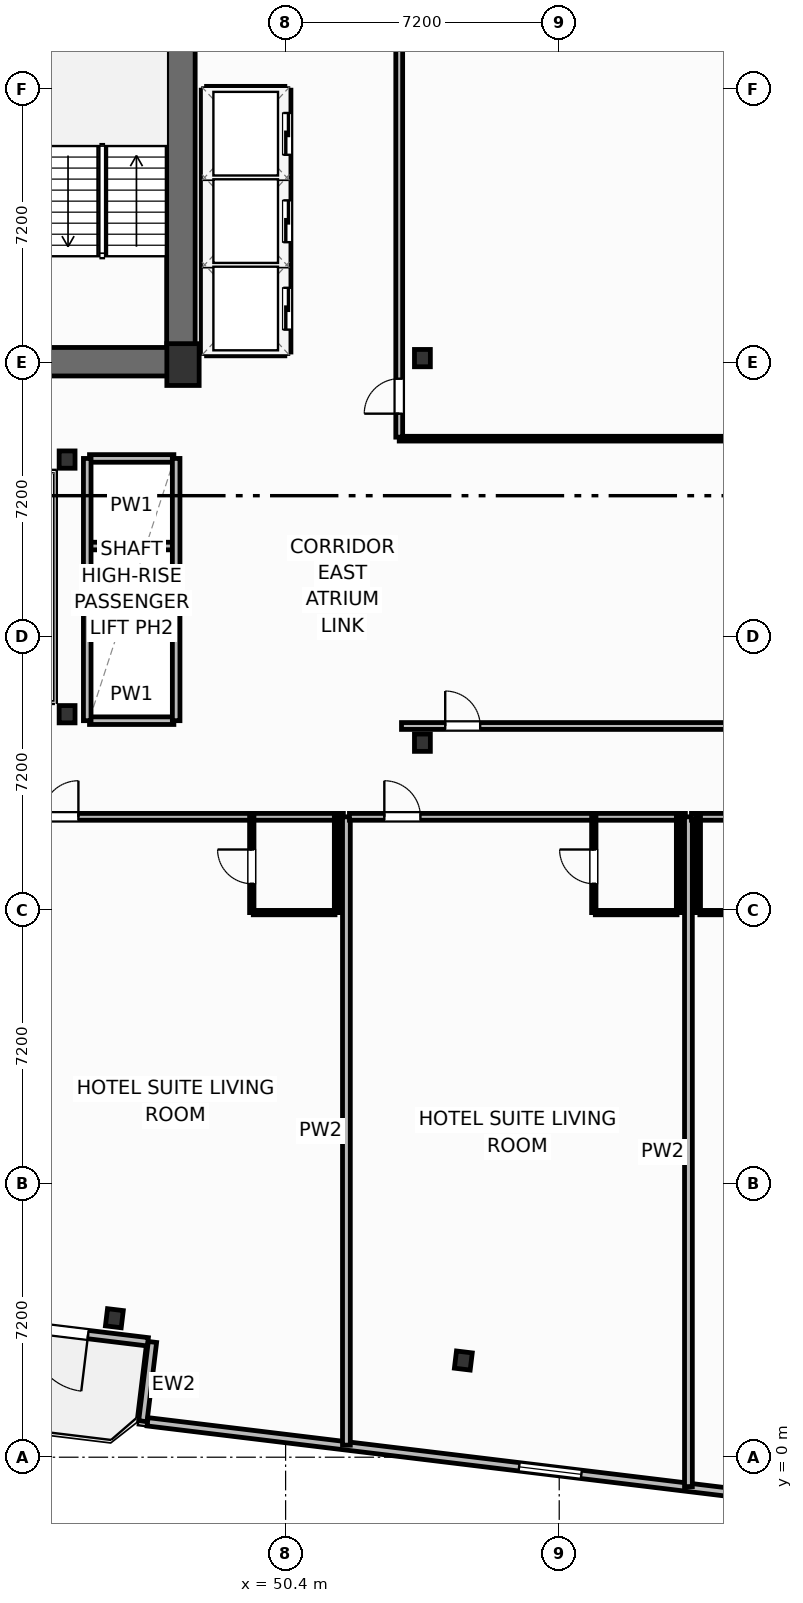
"""IFC4 building model, lengths in metres.
Left out: names, types, materials, properties, quantities, classifications, styles, units other than length and angle.
Written with IfcOpenShell. Run it as: python <this file> out.ifc"""

import sys

from ifc_helpers import new_model, si_unit, direction, frame, frame_2d, origin, origin_2d, place, context, subcontext, project, spatial, rectangle, i_section, extrude, element, fill, save


model = new_model("IFC4")
c1 = context("Model", 3, precision=1e-05, world=origin(), true_north=direction((0.0, 1.0)))
c2 = subcontext(c1, "Body", "Model", "MODEL_VIEW")
j1 = project(units=[si_unit("LENGTHUNIT", "METRE"), si_unit("PLANEANGLEUNIT", "RADIAN")], contexts=[c1])
p1 = place(None, origin())
s1 = spatial("IfcSite", under=j1, at=p1, CompositionType="ELEMENT")
p2 = place(p1, origin())
s2 = spatial("IfcBuilding", under=s1, at=p2, CompositionType="ELEMENT")
p3 = place(p2, frame((0.0, 0.0, 143.9)))
s3 = spatial("IfcBuildingStorey", under=s2, at=p3, CompositionType="ELEMENT", Elevation=143.9)
p4 = place(p3, frame((47.7, 28.75, 0.0), z_axis=(0.0, 0.0, 1.0), x_axis=(1.0, 0.0, 0.0)))
e1 = element("IfcColumn", 1, at=p4, inside=s3, PredefinedType="COLUMN", context=c2, shape_type="SweptSolid", body=[
    extrude(rectangle(XDim=0.85, YDim=1.1, at=origin_2d()), origin(), (0.0, 0.0, 1.0), 3.7),
])
for number, where, z_axis, x_axis in (
    (2, (44.65, 19.55, 0.0), (0.0, 0.0, 1.0), (1.0, 0.0, 0.0)),
    (3, (44.65, 26.25, 0.0), (0.0, 0.0, 1.0), (1.0, 0.0, 0.0)),
    (4, (54.0, 18.8, 0.0), (0.0, 0.0, 1.0), (1.0, 0.0, 0.0)),
    (5, (54.0, 28.92, 0.0), (0.0, 0.0, 1.0), (1.0, 0.0, 0.0)),
):
    element("IfcColumn", number, at=place(p3, frame(where, z_axis=z_axis, x_axis=x_axis)), inside=s3, PredefinedType="COLUMN", context=c2, shape_type="SweptSolid", body=[
        extrude(i_section(OverallWidth=0.418, OverallDepth=0.455, WebThickness=0.042, FlangeThickness=0.068, FilletRadius=0.025, at=origin_2d()), origin(), (0.0, 0.0, 1.0), 3.7),
    ])
p5 = place(p3, frame((47.645, 29.2, 0.0), z_axis=(0.0, 0.0, 1.0), x_axis=(0.0, 1.0, 0.0)))
e6 = element("IfcWall", 6, at=p5, inside=s3, PredefinedType="SHEAR", context=c2, shape_type="SweptSolid", body=[
    extrude(rectangle(XDim=9.22, YDim=0.75, at=frame_2d((4.61, 0.0))), origin(), (0.0, 0.0, 1.0), 3.45),
])
p6 = place(p3, frame((43.6, 28.825, 0.0), z_axis=(0.0, 0.0, 1.0), x_axis=(1.0, 0.0, 0.0)))
e7 = element("IfcWall", 7, at=p6, inside=s3, PredefinedType="SHEAR", context=c2, shape_type="SweptSolid", body=[
    extrude(rectangle(XDim=4.42, YDim=0.75, at=frame_2d((2.21, 0.0))), origin(), (0.0, 0.0, 1.0), 3.45),
])
for number, where, z_axis, x_axis in (
    (8, (45.894, 3.657, 0.0), (0.0, 0.0, 1.0), (0.993, -0.12, 0.0)),
    (9, (55.077, 2.544, 0.0), (0.0, 0.0, 1.0), (0.993, -0.12, 0.0)),
):
    element("IfcColumn", number, at=place(p3, frame(where, z_axis=z_axis, x_axis=x_axis)), inside=s3, PredefinedType="COLUMN", context=c2, shape_type="SweptSolid", body=[
        extrude(i_section(OverallWidth=0.418, OverallDepth=0.455, WebThickness=0.042, FlangeThickness=0.068, FilletRadius=0.025, at=origin_2d()), origin(), (0.0, 0.0, 1.0), 3.7),
    ])
p7 = place(p3, frame((46.776, 3.037, 0.0), z_axis=(0.0, 0.0, 1.0), x_axis=(-0.992735402148, 0.120318000826, 0.0)))
e10 = element("IfcWall", 10, at=p7, inside=s3, PredefinedType="SOLIDWALL", context=c2, shape_type="SweptSolid", body=[
    extrude(rectangle(XDim=6.0, YDim=0.22, at=frame_2d((3.0, 0.0))), origin(), (0.0, 0.0, 1.0), 2.73),
])
p8 = place(p7, frame((1.584, 0.0, 0.0)))
e11 = element("IfcOpeningElement", 11, at=p8, cuts=e10, PredefinedType="OPENING", context=c2, shape_type="SweptSolid", body=[
    extrude(rectangle(XDim=1.5, YDim=2.25, at=frame_2d((0.75, 1.125))), frame((0.0, 0.12, 0.0), z_axis=(0.0, -1.0, 0.0), x_axis=(1.0, 0.0, 0.0)), (0.0, 0.0, 1.0), 0.24),
])
p9 = place(p3, frame((46.896, 3.032, 0.0), z_axis=(0.0, 0.0, 1.0), x_axis=(-0.120327895535, -0.992734202874, 0.0)))
e12 = element("IfcWall", 12, at=p9, inside=s3, PredefinedType="SOLIDWALL", context=c2, shape_type="SweptSolid", body=[
    extrude(rectangle(XDim=2.1, YDim=0.22, at=frame_2d((1.05, 0.0))), origin(), (0.0, 0.0, 1.0), 2.73),
])
p10 = place(p3, frame((46.768, 0.932, 0.0), z_axis=(0.0, 0.0, 1.0), x_axis=(0.992733036814, -0.120337515419, 0.0)))
e13 = element("IfcWall", 13, at=p10, inside=s3, PredefinedType="SOLIDWALL", context=c2, shape_type="SweptSolid", body=[
    extrude(rectangle(XDim=21.347, YDim=0.22, at=frame_2d((10.673, 0.0))), origin(), (0.0, 0.0, 1.0), 2.73),
])
p11 = place(p10, frame((9.849, 0.0, 0.8)))
e14 = element("IfcOpeningElement", 14, at=p11, cuts=e13, PredefinedType="OPENING", context=c2, shape_type="SweptSolid", body=[
    extrude(rectangle(XDim=1.65, YDim=1.65, at=frame_2d((0.825, 0.825))), frame((0.0, 0.12, 0.0), z_axis=(0.0, -1.0, 0.0), x_axis=(1.0, 0.0, 0.0)), (0.0, 0.0, 1.0), 0.24),
])
p12 = place(p3, frame((43.08, 16.85, 0.0), z_axis=(0.0, 0.0, 1.0), x_axis=(1.0, 0.0, 0.0)))
e15 = element("IfcWall", 15, at=p12, inside=s3, PredefinedType="PARTITIONING", context=c2, shape_type="SweptSolid", body=[
    extrude(rectangle(XDim=8.84, YDim=0.18, at=frame_2d((4.42, 0.0))), origin(), (0.0, 0.0, 1.0), 3.45),
])
p13 = place(p12, frame((0.918, 0.0, 0.0)))
e16 = element("IfcOpeningElement", 16, at=p13, cuts=e15, PredefinedType="OPENING", context=c2, shape_type="SweptSolid", body=[
    extrude(rectangle(XDim=0.95, YDim=2.15, at=frame_2d((0.475, 1.075))), frame((0.0, 0.1, 0.0), z_axis=(0.0, -1.0, 0.0), x_axis=(1.0, 0.0, 0.0)), (0.0, 0.0, 1.0), 0.2),
])
p14 = place(p3, frame((49.55, 14.33, 0.0), z_axis=(0.0, 0.0, 1.0), x_axis=(1.0, 0.0, 0.0)))
e17 = element("IfcWall", 17, at=p14, inside=s3, PredefinedType="PARTITIONING", context=c2, shape_type="SweptSolid", body=[
    extrude(rectangle(XDim=2.15, YDim=0.115, at=frame_2d((1.075, 0.0))), origin(), (0.0, 0.0, 1.0), 3.45),
])
p15 = place(p3, frame((49.51, 14.33, 0.0), z_axis=(0.0, 0.0, 1.0), x_axis=(0.0, 1.0, 0.0)))
e18 = element("IfcWall", 18, at=p15, inside=s3, PredefinedType="PARTITIONING", context=c2, shape_type="SweptSolid", body=[
    extrude(rectangle(XDim=2.52, YDim=0.115, at=frame_2d((1.26, 0.0))), origin(), (0.0, 0.0, 1.0), 3.45),
])
p16 = place(p15, frame((0.76, 0.0, 0.0)))
e19 = element("IfcOpeningElement", 19, at=p16, cuts=e18, PredefinedType="OPENING", context=c2, shape_type="SweptSolid", body=[
    extrude(rectangle(XDim=0.9, YDim=2.05, at=frame_2d((0.45, 1.025))), frame((0.0, 0.067, 0.0), z_axis=(0.0, -1.0, 0.0), x_axis=(1.0, 0.0, 0.0)), (0.0, 0.0, 1.0), 0.135),
])
p17 = place(p3, frame((51.74, 14.33, 0.0), z_axis=(0.0, 0.0, 1.0), x_axis=(0.0, 1.0, 0.0)))
e20 = element("IfcWall", 20, at=p17, inside=s3, PredefinedType="PARTITIONING", context=c2, shape_type="SweptSolid", body=[
    extrude(rectangle(XDim=2.52, YDim=0.115, at=frame_2d((1.26, 0.0))), origin(), (0.0, 0.0, 1.0), 3.45),
])
p18 = place(p3, frame((52.0, 0.318, 0.0), z_axis=(0.0, 0.0, 1.0), x_axis=(0.0, 1.0, 0.0)))
e21 = element("IfcWall", 21, at=p18, inside=s3, PredefinedType="PARTITIONING", context=c2, shape_type="SweptSolid", body=[
    extrude(rectangle(XDim=16.532, YDim=0.205, at=frame_2d((8.266, 0.0))), origin(), (0.0, 0.0, 1.0), 3.45),
])
p19 = place(p3, frame((52.08, 16.85, 0.0), z_axis=(0.0, 0.0, 1.0), x_axis=(1.0, 0.0, 0.0)))
e22 = element("IfcWall", 22, at=p19, inside=s3, PredefinedType="PARTITIONING", context=c2, shape_type="SweptSolid", body=[
    extrude(rectangle(XDim=8.84, YDim=0.18, at=frame_2d((4.42, 0.0))), origin(), (0.0, 0.0, 1.0), 3.45),
])
p20 = place(p19, frame((0.918, 0.0, 0.0)))
e23 = element("IfcOpeningElement", 23, at=p20, cuts=e22, PredefinedType="OPENING", context=c2, shape_type="SweptSolid", body=[
    extrude(rectangle(XDim=0.95, YDim=2.15, at=frame_2d((0.475, 1.075))), frame((0.0, 0.1, 0.0), z_axis=(0.0, -1.0, 0.0), x_axis=(1.0, 0.0, 0.0)), (0.0, 0.0, 1.0), 0.2),
])
p21 = place(p3, frame((58.55, 14.33, 0.0), z_axis=(0.0, 0.0, 1.0), x_axis=(1.0, 0.0, 0.0)))
e24 = element("IfcWall", 24, at=p21, inside=s3, PredefinedType="PARTITIONING", context=c2, shape_type="SweptSolid", body=[
    extrude(rectangle(XDim=2.15, YDim=0.115, at=frame_2d((1.075, 0.0))), origin(), (0.0, 0.0, 1.0), 3.45),
])
p22 = place(p3, frame((58.51, 14.33, 0.0), z_axis=(0.0, 0.0, 1.0), x_axis=(0.0, 1.0, 0.0)))
e25 = element("IfcWall", 25, at=p22, inside=s3, PredefinedType="PARTITIONING", context=c2, shape_type="SweptSolid", body=[
    extrude(rectangle(XDim=2.52, YDim=0.115, at=frame_2d((1.26, 0.0))), origin(), (0.0, 0.0, 1.0), 3.45),
])
p23 = place(p22, frame((0.76, 0.0, 0.0)))
e26 = element("IfcOpeningElement", 26, at=p23, cuts=e25, PredefinedType="OPENING", context=c2, shape_type="SweptSolid", body=[
    extrude(rectangle(XDim=0.9, YDim=2.05, at=frame_2d((0.45, 1.025))), frame((0.0, 0.067, 0.0), z_axis=(0.0, -1.0, 0.0), x_axis=(1.0, 0.0, 0.0)), (0.0, 0.0, 1.0), 0.135),
])
p24 = place(p3, frame((60.74, 14.33, 0.0), z_axis=(0.0, 0.0, 1.0), x_axis=(0.0, 1.0, 0.0)))
e27 = element("IfcWall", 27, at=p24, inside=s3, PredefinedType="PARTITIONING", context=c2, shape_type="SweptSolid", body=[
    extrude(rectangle(XDim=2.52, YDim=0.115, at=frame_2d((1.26, 0.0))), origin(), (0.0, 0.0, 1.0), 3.45),
])
p25 = place(p3, frame((61.0, -0.773, 0.0), z_axis=(0.0, 0.0, 1.0), x_axis=(0.0, 1.0, 0.0)))
e28 = element("IfcWall", 28, at=p25, inside=s3, PredefinedType="PARTITIONING", context=c2, shape_type="SweptSolid", body=[
    extrude(rectangle(XDim=17.623, YDim=0.205, at=frame_2d((8.812, 0.0))), origin(), (0.0, 0.0, 1.0), 3.45),
])
p26 = place(p3, frame((61.08, 16.85, 0.0), z_axis=(0.0, 0.0, 1.0), x_axis=(1.0, 0.0, 0.0)))
e29 = element("IfcWall", 29, at=p26, inside=s3, PredefinedType="PARTITIONING", context=c2, shape_type="SweptSolid", body=[
    extrude(rectangle(XDim=14.387, YDim=0.18, at=frame_2d((7.193, 0.0))), origin(), (0.0, 0.0, 1.0), 3.45),
])
p27 = place(p26, frame((3.11, 0.0, 0.0)))
e30 = element("IfcOpeningElement", 30, at=p27, cuts=e29, PredefinedType="OPENING", context=c2, shape_type="SweptSolid", body=[
    extrude(rectangle(XDim=0.95, YDim=2.15, at=frame_2d((0.475, 1.075))), frame((0.0, 0.1, 0.0), z_axis=(0.0, -1.0, 0.0), x_axis=(1.0, 0.0, 0.0)), (0.0, 0.0, 1.0), 0.2),
])
p28 = place(p3, frame((61.3, 14.33, 0.0), z_axis=(0.0, 0.0, 1.0), x_axis=(1.0, 0.0, 0.0)))
e31 = element("IfcWall", 31, at=p28, inside=s3, PredefinedType="PARTITIONING", context=c2, shape_type="SweptSolid", body=[
    extrude(rectangle(XDim=1.807, YDim=0.115, at=frame_2d((0.904, 0.0))), origin(), (0.0, 0.0, 1.0), 3.45),
])
p29 = place(p3, frame((61.26, 14.33, 0.0), z_axis=(0.0, 0.0, 1.0), x_axis=(0.0, 1.0, 0.0)))
e32 = element("IfcWall", 32, at=p29, inside=s3, PredefinedType="PARTITIONING", context=c2, shape_type="SweptSolid", body=[
    extrude(rectangle(XDim=2.52, YDim=0.115, at=frame_2d((1.26, 0.0))), origin(), (0.0, 0.0, 1.0), 3.45),
])
p30 = place(p3, frame((53.45, 19.24, 0.0), z_axis=(0.0, 0.0, 1.0), x_axis=(1.0, 0.0, 0.0)))
e33 = element("IfcWall", 33, at=p30, inside=s3, PredefinedType="PARTITIONING", context=c2, shape_type="SweptSolid", body=[
    extrude(rectangle(XDim=22.307, YDim=0.18, at=frame_2d((11.153, 0.0))), origin(), (0.0, 0.0, 1.0), 2.662),
])
p31 = place(p30, frame((1.15, 0.0, 0.0)))
e34 = element("IfcOpeningElement", 34, at=p31, cuts=e33, PredefinedType="OPENING", context=c2, shape_type="SweptSolid", body=[
    extrude(rectangle(XDim=0.92, YDim=2.05, at=frame_2d((0.46, 1.025))), frame((0.0, 0.1, 0.0), z_axis=(0.0, -1.0, 0.0), x_axis=(1.0, 0.0, 0.0)), (0.0, 0.0, 1.0), 0.2),
])
p32 = place(p3, frame((53.39, 26.8, 0.0), z_axis=(0.0, 0.0, 1.0), x_axis=(1.0, 0.0, 0.0)))
e35 = element("IfcWall", 35, at=p32, inside=s3, PredefinedType="PARTITIONING", context=c2, shape_type="SweptSolid", body=[
    extrude(rectangle(XDim=23.283, YDim=0.125, at=frame_2d((11.642, 0.0))), origin(), (0.0, 0.0, 1.0), 3.45),
])
p33 = place(p3, frame((53.39, 26.84, 0.0), z_axis=(0.0, 0.0, 1.0), x_axis=(0.0, 1.0, 0.0)))
e36 = element("IfcWall", 36, at=p33, inside=s3, PredefinedType="PARTITIONING", context=c2, shape_type="SweptSolid", body=[
    extrude(rectangle(XDim=12.46, YDim=0.18, at=frame_2d((6.23, 0.0))), origin(), (0.0, 0.0, 1.0), 3.45),
])
p34 = place(p33, frame((0.618, 0.0, 0.0)))
e37 = element("IfcOpeningElement", 37, at=p34, cuts=e36, PredefinedType="OPENING", context=c2, shape_type="SweptSolid", body=[
    extrude(rectangle(XDim=0.92, YDim=2.05, at=frame_2d((0.46, 1.025))), frame((0.0, 0.1, 0.0), z_axis=(0.0, -1.0, 0.0), x_axis=(1.0, 0.0, 0.0)), (0.0, 0.0, 1.0), 0.2),
])
for number, where, z_axis, x_axis in (
    (38, (48.32, 31.375, 0.0), (0.0, 0.0, 1.0), (1.0, 0.0, 0.0)),
    (39, (48.32, 33.675, 0.0), (0.0, 0.0, 1.0), (1.0, 0.0, 0.0)),
):
    element("IfcWall", number, at=place(p3, frame(where, z_axis=z_axis, x_axis=x_axis)), inside=s3, PredefinedType="PARTITIONING", context=c2, shape_type="SweptSolid", body=[
        extrude(rectangle(XDim=2.06, YDim=0.2, at=frame_2d((1.03, 0.0))), origin(), (0.0, 0.0, 1.0), 3.45),
    ])
p35 = place(p3, frame((48.32, 29.08, 0.0), z_axis=(0.0, 0.0, 1.0), x_axis=(1.0, 0.0, 0.0)))
e40 = element("IfcWall", 40, at=p35, inside=s3, PredefinedType="PARTITIONING", context=c2, shape_type="SweptSolid", body=[
    extrude(rectangle(XDim=2.06, YDim=0.2, at=frame_2d((1.03, 0.0))), origin(), (0.0, 0.0, 1.0), 2.662),
])
p36 = place(p3, frame((48.32, 35.97, 0.0), z_axis=(0.0, 0.0, 1.0), x_axis=(1.0, 0.0, 0.0)))
e41 = element("IfcWall", 41, at=p36, inside=s3, PredefinedType="PARTITIONING", context=c2, shape_type="SweptSolid", body=[
    extrude(rectangle(XDim=2.06, YDim=0.2, at=frame_2d((1.03, 0.0))), origin(), (0.0, 0.0, 1.0), 3.45),
])
p37 = place(p3, frame((48.28, 29.08, 0.0), z_axis=(0.0, 0.0, 1.0), x_axis=(0.0, 1.0, 0.0)))
e42 = element("IfcWall", 42, at=p37, inside=s3, PredefinedType="PARTITIONING", context=c2, shape_type="SweptSolid", body=[
    extrude(rectangle(XDim=6.89, YDim=0.2, at=frame_2d((3.445, 0.0))), origin(), (0.0, 0.0, 1.0), 3.45),
])
p38 = place(p3, frame((50.44, 29.08, 0.0), z_axis=(0.0, 0.0, 1.0), x_axis=(0.0, 1.0, 0.0)))
e43 = element("IfcWall", 43, at=p38, inside=s3, PredefinedType="PARTITIONING", context=c2, shape_type="SweptSolid", body=[
    extrude(rectangle(XDim=6.89, YDim=0.2, at=frame_2d((3.445, 0.0))), origin(), (0.0, 0.0, 1.0), 3.45),
])
p39 = place(p38, frame((0.59, 0.0, 0.0)))
e44 = element("IfcOpeningElement", 44, at=p39, cuts=e43, PredefinedType="OPENING", context=c2, shape_type="SweptSolid", body=[
    extrude(rectangle(XDim=1.1, YDim=2.15, at=frame_2d((0.55, 1.075))), frame((0.0, 0.11, 0.0), z_axis=(0.0, -1.0, 0.0), x_axis=(1.0, 0.0, 0.0)), (0.0, 0.0, 1.0), 0.22),
])
p40 = place(p38, frame((2.89, 0.0, 0.0)))
e45 = element("IfcOpeningElement", 45, at=p40, cuts=e43, PredefinedType="OPENING", context=c2, shape_type="SweptSolid", body=[
    extrude(rectangle(XDim=1.1, YDim=2.15, at=frame_2d((0.55, 1.075))), frame((0.0, 0.11, 0.0), z_axis=(0.0, -1.0, 0.0), x_axis=(1.0, 0.0, 0.0)), (0.0, 0.0, 1.0), 0.22),
])
p41 = place(p38, frame((5.19, 0.0, 0.0)))
e46 = element("IfcOpeningElement", 46, at=p41, cuts=e43, PredefinedType="OPENING", context=c2, shape_type="SweptSolid", body=[
    extrude(rectangle(XDim=1.1, YDim=2.15, at=frame_2d((0.55, 1.075))), frame((0.0, 0.11, 0.0), z_axis=(0.0, -1.0, 0.0), x_axis=(1.0, 0.0, 0.0)), (0.0, 0.0, 1.0), 0.22),
])
for number, where, z_axis, x_axis in (
    (47, (45.24, 21.675, 0.0), (0.0, 0.0, 1.0), (1.0, 0.0, 0.0)),
    (48, (45.24, 23.975, 0.0), (0.0, 0.0, 1.0), (1.0, 0.0, 0.0)),
):
    element("IfcWall", number, at=place(p3, frame(where, z_axis=z_axis, x_axis=x_axis)), inside=s3, PredefinedType="PARTITIONING", context=c2, shape_type="SweptSolid", body=[
        extrude(rectangle(XDim=2.22, YDim=0.2, at=frame_2d((1.11, 0.0))), origin(), (0.0, 0.0, 1.0), 3.45),
    ])
p42 = place(p3, frame((45.24, 19.38, 0.0), z_axis=(0.0, 0.0, 1.0), x_axis=(1.0, 0.0, 0.0)))
e49 = element("IfcWall", 49, at=p42, inside=s3, PredefinedType="PARTITIONING", context=c2, shape_type="SweptSolid", body=[
    extrude(rectangle(XDim=2.22, YDim=0.2, at=frame_2d((1.11, 0.0))), origin(), (0.0, 0.0, 1.0), 2.662),
])
p43 = place(p3, frame((45.24, 26.28, 0.0), z_axis=(0.0, 0.0, 1.0), x_axis=(1.0, 0.0, 0.0)))
e50 = element("IfcWall", 50, at=p43, inside=s3, PredefinedType="PARTITIONING", context=c2, shape_type="SweptSolid", body=[
    extrude(rectangle(XDim=2.22, YDim=0.2, at=frame_2d((1.11, 0.0))), origin(), (0.0, 0.0, 1.0), 3.45),
])
for number, where, z_axis, x_axis in (
    (51, (45.18, 19.38, 0.0), (0.0, 0.0, 1.0), (0.0, 1.0, 0.0)),
    (52, (47.52, 19.38, 0.0), (0.0, 0.0, 1.0), (0.0, 1.0, 0.0)),
):
    element("IfcWall", number, at=place(p3, frame(where, z_axis=z_axis, x_axis=x_axis)), inside=s3, PredefinedType="PARTITIONING", context=c2, shape_type="SweptSolid", body=[
        extrude(rectangle(XDim=6.9, YDim=0.2, at=frame_2d((3.45, 0.0))), origin(), (0.0, 0.0, 1.0), 3.45),
    ])
p44 = place(p8, origin())
e53 = element("IfcDoor", 53, at=p44, inside=s3, OperationType="SINGLE_SWING_LEFT", PredefinedType="DOOR", context=c2, shape_type="SweptSolid", body=[
    extrude(rectangle(XDim=1.5, YDim=2.25, at=frame_2d((0.75, 1.125))), frame((0.0, 0.025, 0.0), z_axis=(0.0, -1.0, 0.0), x_axis=(1.0, 0.0, 0.0)), (0.0, 0.0, 1.0), 0.05),
])
fill(e11, e53)
p45 = place(p11, origin())
e54 = element("IfcWindow", 54, at=p45, inside=s3, PartitioningType="SINGLE_PANEL", PredefinedType="WINDOW", context=c2, shape_type="SweptSolid", body=[
    extrude(rectangle(XDim=1.65, YDim=1.65, at=frame_2d((0.825, 0.825))), frame((0.0, 0.03, 0.0), z_axis=(0.0, -1.0, 0.0), x_axis=(1.0, 0.0, 0.0)), (0.0, 0.0, 1.0), 0.06),
])
fill(e14, e54)
p46 = place(p13, origin())
e55 = element("IfcDoor", 55, at=p46, inside=s3, OperationType="SINGLE_SWING_RIGHT", PredefinedType="DOOR", context=c2, shape_type="SweptSolid", body=[
    extrude(rectangle(XDim=0.95, YDim=2.15, at=frame_2d((0.475, 1.075))), frame((0.0, 0.025, 0.0), z_axis=(0.0, -1.0, 0.0), x_axis=(1.0, 0.0, 0.0)), (0.0, 0.0, 1.0), 0.05),
])
fill(e16, e55)
p47 = place(p16, origin())
e56 = element("IfcDoor", 56, at=p47, inside=s3, OperationType="SINGLE_SWING_RIGHT", PredefinedType="DOOR", context=c2, shape_type="SweptSolid", body=[
    extrude(rectangle(XDim=0.9, YDim=2.05, at=frame_2d((0.45, 1.025))), frame((0.0, 0.025, 0.0), z_axis=(0.0, -1.0, 0.0), x_axis=(1.0, 0.0, 0.0)), (0.0, 0.0, 1.0), 0.05),
])
fill(e19, e56)
p48 = place(p20, origin())
e57 = element("IfcDoor", 57, at=p48, inside=s3, OperationType="SINGLE_SWING_LEFT", PredefinedType="DOOR", context=c2, shape_type="SweptSolid", body=[
    extrude(rectangle(XDim=0.95, YDim=2.15, at=frame_2d((0.475, 1.075))), frame((0.0, 0.025, 0.0), z_axis=(0.0, -1.0, 0.0), x_axis=(1.0, 0.0, 0.0)), (0.0, 0.0, 1.0), 0.05),
])
fill(e23, e57)
p49 = place(p23, origin())
e58 = element("IfcDoor", 58, at=p49, inside=s3, OperationType="SINGLE_SWING_RIGHT", PredefinedType="DOOR", context=c2, shape_type="SweptSolid", body=[
    extrude(rectangle(XDim=0.9, YDim=2.05, at=frame_2d((0.45, 1.025))), frame((0.0, 0.025, 0.0), z_axis=(0.0, -1.0, 0.0), x_axis=(1.0, 0.0, 0.0)), (0.0, 0.0, 1.0), 0.05),
])
fill(e26, e58)
p50 = place(p31, origin())
e59 = element("IfcDoor", 59, at=p50, inside=s3, OperationType="SINGLE_SWING_LEFT", PredefinedType="DOOR", context=c2, shape_type="SweptSolid", body=[
    extrude(rectangle(XDim=0.92, YDim=2.05, at=frame_2d((0.46, 1.025))), frame((0.0, 0.025, 0.0), z_axis=(0.0, -1.0, 0.0), x_axis=(1.0, 0.0, 0.0)), (0.0, 0.0, 1.0), 0.05),
])
fill(e34, e59)
p51 = place(p34, origin())
e60 = element("IfcDoor", 60, at=p51, inside=s3, OperationType="SINGLE_SWING_LEFT", PredefinedType="DOOR", context=c2, shape_type="SweptSolid", body=[
    extrude(rectangle(XDim=0.92, YDim=2.05, at=frame_2d((0.46, 1.025))), frame((0.0, 0.025, 0.0), z_axis=(0.0, -1.0, 0.0), x_axis=(1.0, 0.0, 0.0)), (0.0, 0.0, 1.0), 0.05),
])
fill(e37, e60)
p52 = place(p39, origin())
e61 = element("IfcDoor", 61, at=p52, inside=s3, OperationType="SLIDING_TO_LEFT", PredefinedType="DOOR", context=c2, shape_type="SweptSolid", body=[
    extrude(rectangle(XDim=1.1, YDim=2.15, at=frame_2d((0.55, 1.075))), frame((0.0, 0.025, 0.0), z_axis=(0.0, -1.0, 0.0), x_axis=(1.0, 0.0, 0.0)), (0.0, 0.0, 1.0), 0.05),
])
fill(e44, e61)
p53 = place(p40, origin())
e62 = element("IfcDoor", 62, at=p53, inside=s3, OperationType="SLIDING_TO_LEFT", PredefinedType="DOOR", context=c2, shape_type="SweptSolid", body=[
    extrude(rectangle(XDim=1.1, YDim=2.15, at=frame_2d((0.55, 1.075))), frame((0.0, 0.025, 0.0), z_axis=(0.0, -1.0, 0.0), x_axis=(1.0, 0.0, 0.0)), (0.0, 0.0, 1.0), 0.05),
])
fill(e45, e62)
p54 = place(p41, origin())
e63 = element("IfcDoor", 63, at=p54, inside=s3, OperationType="SLIDING_TO_LEFT", PredefinedType="DOOR", context=c2, shape_type="SweptSolid", body=[
    extrude(rectangle(XDim=1.1, YDim=2.15, at=frame_2d((0.55, 1.075))), frame((0.0, 0.025, 0.0), z_axis=(0.0, -1.0, 0.0), x_axis=(1.0, 0.0, 0.0)), (0.0, 0.0, 1.0), 0.05),
])
fill(e46, e63)
save(model, sys.argv[1])
